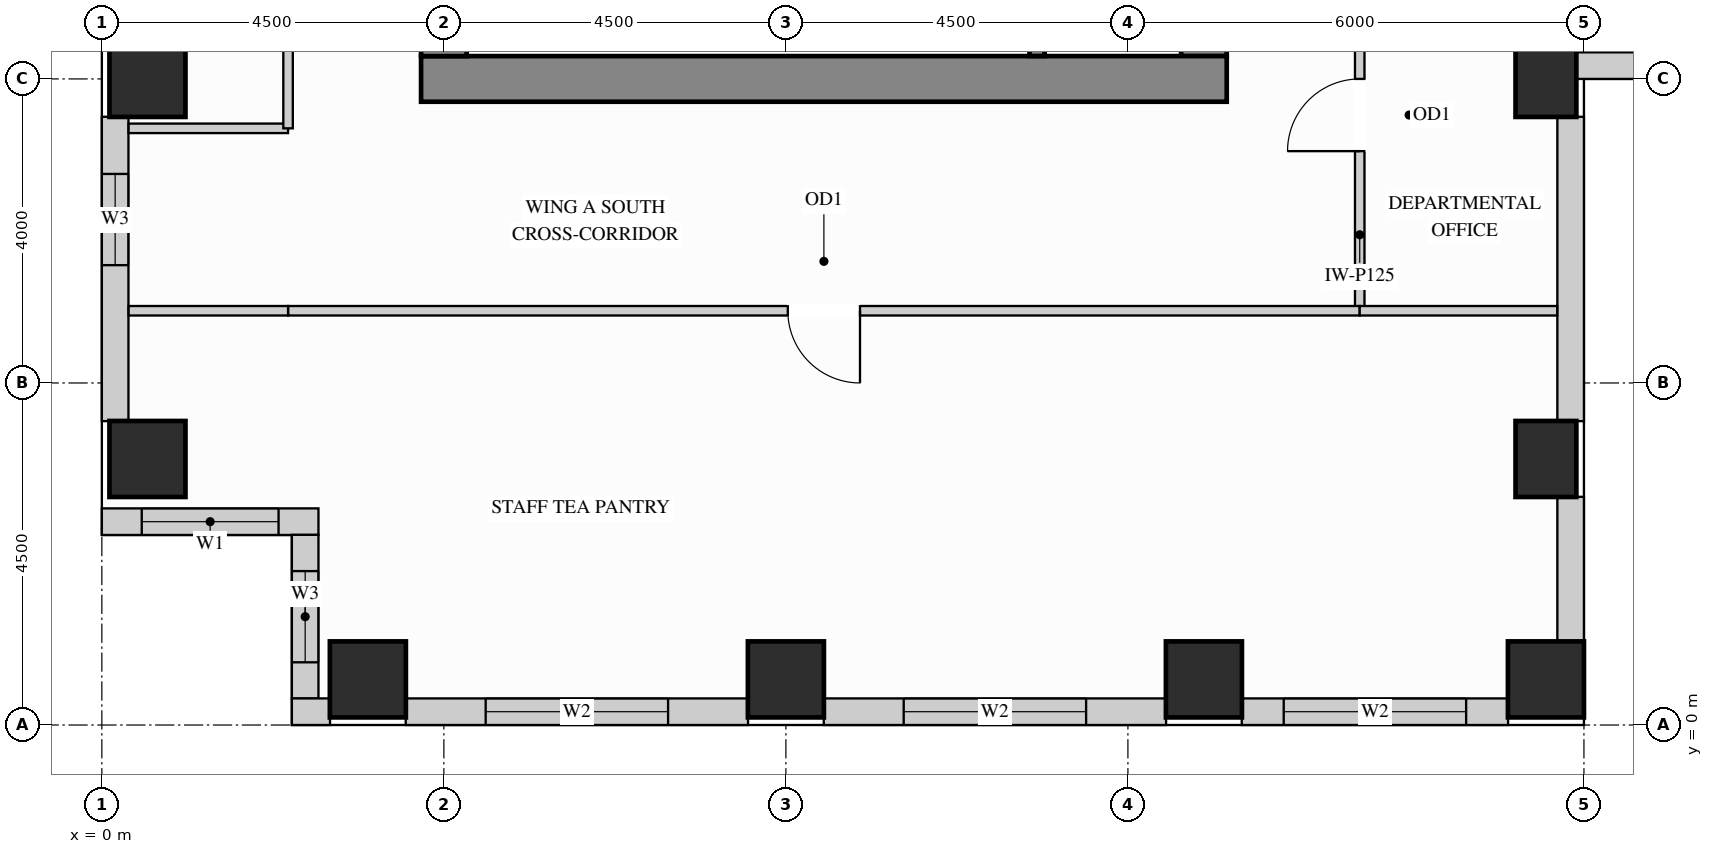
"""IFC4 building model, lengths in metres.
Left out: names, types, materials, properties, quantities, classifications, styles, units other than length and angle.
Written with IfcOpenShell. Run it as: python <this file> out.ifc"""

import sys

from ifc_helpers import new_model, si_unit, direction, frame, frame_2d, origin, origin_2d, place, context, subcontext, project, spatial, rectangle, extrude, source, transform, mapped, element, fill, save


model = new_model("IFC4")
c1 = context("Model", 3, precision=1e-05, world=origin(), true_north=direction((0.0, 1.0)))
c2 = subcontext(c1, "Body", "Model", "MODEL_VIEW")
j1 = project(units=[si_unit("LENGTHUNIT", "METRE"), si_unit("PLANEANGLEUNIT", "RADIAN")], contexts=[c1])
p1 = place(None, origin())
s1 = spatial("IfcSite", under=j1, at=p1, CompositionType="ELEMENT")
p2 = place(p1, origin())
s2 = spatial("IfcBuilding", under=s1, at=p2, CompositionType="ELEMENT")
p3 = place(p2, frame((0.0, 0.0, 171.9)))
s3 = spatial("IfcBuildingStorey", under=s2, at=p3, CompositionType="ELEMENT", Elevation=171.9)
m1 = source(origin(), c2, "Body", "SweptSolid", [
    extrude(rectangle(XDim=0.8, YDim=1.0, at=origin_2d()), origin(), (0.0, 0.0, 1.0), 3.4),
])
for number, where, z_axis, x_axis in (
    (1, (19.0, 3.5, 0.0), (0.0, 0.0, 1.0), (1.0, 0.0, 0.0)),
    (2, (19.0, 8.5, 0.0), (0.0, 0.0, 1.0), (1.0, 0.0, 0.0)),
):
    element("IfcColumn", number, at=place(p3, frame(where, z_axis=z_axis, x_axis=x_axis)), inside=s3, PredefinedType="COLUMN", context=c2, shape_type="MappedRepresentation", body=[
        mapped(m1, transform((0.0, 0.0, 0.0), x_axis=(1.0, 0.0, 0.0), y_axis=(0.0, 1.0, 0.0), z_axis=(0.0, 0.0, 1.0))),
    ])
m2 = source(origin(), c2, "Body", "SweptSolid", [
    extrude(rectangle(XDim=1.0, YDim=1.0, at=origin_2d()), origin(), (0.0, 0.0, 1.0), 3.4),
])
for number, where, z_axis, x_axis in (
    (3, (14.5, 0.6, 0.0), (0.0, 0.0, 1.0), (1.0, 0.0, 0.0)),
    (4, (19.0, 0.6, 0.0), (0.0, 0.0, 1.0), (1.0, 0.0, 0.0)),
    (5, (3.5, 0.6, 0.0), (0.0, 0.0, 1.0), (1.0, 0.0, 0.0)),
    (6, (9.0, 0.6, 0.0), (0.0, 0.0, 1.0), (1.0, 0.0, 0.0)),
    (7, (0.6, 3.5, 0.0), (0.0, 0.0, 1.0), (1.0, 0.0, 0.0)),
    (8, (0.6, 8.5, 0.0), (0.0, 0.0, 1.0), (1.0, 0.0, 0.0)),
):
    element("IfcColumn", number, at=place(p3, frame(where, z_axis=z_axis, x_axis=x_axis)), inside=s3, PredefinedType="COLUMN", context=c2, shape_type="MappedRepresentation", body=[
        mapped(m2, transform((0.0, 0.0, 0.0), x_axis=(1.0, 0.0, 0.0), y_axis=(0.0, 1.0, 0.0), z_axis=(0.0, 0.0, 1.0))),
    ])
m3 = source(origin(), c2, "Body", "SweptSolid", [
    extrude(rectangle(XDim=10.02, YDim=0.6, at=frame_2d((5.01, 0.0))), origin(), (0.0, 0.0, 1.0), 3.4),
])
p4 = place(p3, frame((14.5, 8.8, 0.0), z_axis=(0.0, 0.0, 1.0), x_axis=(0.0, 1.0, 0.0)))
e9 = element("IfcWall", 9, at=p4, inside=s3, PredefinedType="SHEAR", context=c2, shape_type="MappedRepresentation", body=[
    mapped(m3, transform((0.0, 0.0, 0.0), x_axis=(1.0, 0.0, 0.0), y_axis=(0.0, 1.0, 0.0), z_axis=(0.0, 0.0, 1.0))),
])
m4 = source(origin(), c2, "Body", "SweptSolid", [
    extrude(rectangle(XDim=10.6, YDim=0.6, at=frame_2d((5.3, 0.0))), origin(), (0.0, 0.0, 1.0), 3.4),
])
p5 = place(p3, frame((4.2, 8.5, 0.0), z_axis=(0.0, 0.0, 1.0), x_axis=(1.0, 0.0, 0.0)))
e10 = element("IfcWall", 10, at=p5, inside=s3, PredefinedType="SHEAR", context=c2, shape_type="MappedRepresentation", body=[
    mapped(m4, transform((0.0, 0.0, 0.0), x_axis=(1.0, 0.0, 0.0), y_axis=(0.0, 1.0, 0.0), z_axis=(0.0, 0.0, 1.0))),
])
m5 = source(origin(), c2, "Body", "SweptSolid", [
    extrude(rectangle(XDim=20.4, YDim=0.6, at=frame_2d((10.2, 0.0))), origin(), (0.0, 0.0, 1.0), 3.4),
])
p6 = place(p3, frame((4.5, 8.8, 0.0), z_axis=(0.0, 0.0, 1.0), x_axis=(0.0, 1.0, 0.0)))
e11 = element("IfcWall", 11, at=p6, inside=s3, PredefinedType="SHEAR", context=c2, shape_type="MappedRepresentation", body=[
    mapped(m5, transform((0.0, 0.0, 0.0), x_axis=(1.0, 0.0, 0.0), y_axis=(0.0, 1.0, 0.0), z_axis=(0.0, 0.0, 1.0))),
])
p7 = place(p3, frame((0.175, 8.002, 0.0), z_axis=(0.0, 0.0, 1.0), x_axis=(0.0, -1.0, 0.0)))
e12 = element("IfcWall", 12, at=p7, inside=s3, PredefinedType="SOLIDWALL", context=c2, shape_type="SweptSolid", body=[
    extrude(rectangle(XDim=4.004, YDim=0.35, at=frame_2d((2.002, 0.0))), origin(), (0.0, 0.0, 1.0), 2.612),
])
p8 = place(p7, frame((0.752, 0.0, 0.78)))
e13 = element("IfcOpeningElement", 13, at=p8, cuts=e12, PredefinedType="OPENING", context=c2, shape_type="SweptSolid", body=[
    extrude(rectangle(XDim=1.2, YDim=1.652, at=frame_2d((0.6, 0.826))), frame((0.0, 0.185, 0.0), z_axis=(0.0, -1.0, 0.0), x_axis=(1.0, 0.0, 0.0)), (0.0, 0.0, 1.0), 0.37),
])
p9 = place(p3, frame((0.0, 2.675, 0.0), z_axis=(0.0, 0.0, 1.0), x_axis=(1.0, 0.0, 0.0)))
e14 = element("IfcWall", 14, at=p9, inside=s3, PredefinedType="SOLIDWALL", context=c2, shape_type="SweptSolid", body=[
    extrude(rectangle(XDim=2.85, YDim=0.35, at=frame_2d((1.425, 0.0))), origin(), (0.0, 0.0, 1.0), 3.385),
])
p10 = place(p9, frame((0.525, 0.0, 0.78)))
e15 = element("IfcOpeningElement", 15, at=p10, cuts=e14, PredefinedType="OPENING", context=c2, shape_type="SweptSolid", body=[
    extrude(rectangle(XDim=1.8, YDim=2.1, at=frame_2d((0.9, 1.05))), frame((0.0, 0.185, 0.0), z_axis=(0.0, -1.0, 0.0), x_axis=(1.0, 0.0, 0.0)), (0.0, 0.0, 1.0), 0.37),
])
p11 = place(p3, frame((2.675, 2.502, 0.0), z_axis=(0.0, 0.0, 1.0), x_axis=(0.0, -1.0, 0.0)))
e16 = element("IfcWall", 16, at=p11, inside=s3, PredefinedType="SOLIDWALL", context=c2, shape_type="SweptSolid", body=[
    extrude(rectangle(XDim=2.154, YDim=0.35, at=frame_2d((1.077, 0.0))), origin(), (0.0, 0.0, 1.0), 3.385),
])
p12 = place(p11, frame((0.477, 0.0, 0.78)))
e17 = element("IfcOpeningElement", 17, at=p12, cuts=e16, PredefinedType="OPENING", context=c2, shape_type="SweptSolid", body=[
    extrude(rectangle(XDim=1.2, YDim=2.1, at=frame_2d((0.6, 1.05))), frame((0.0, 0.185, 0.0), z_axis=(0.0, -1.0, 0.0), x_axis=(1.0, 0.0, 0.0)), (0.0, 0.0, 1.0), 0.37),
])
m6 = source(origin(), c2, "Body", "SweptSolid", [
    extrude(rectangle(XDim=0.502, YDim=0.35, at=frame_2d((0.251, 0.0))), origin(), (0.0, 0.0, 1.0), 3.385),
])
p13 = place(p3, frame((2.5, 0.175, 0.0), z_axis=(0.0, 0.0, 1.0), x_axis=(1.0, 0.0, 0.0)))
e18 = element("IfcWall", 18, at=p13, inside=s3, PredefinedType="SOLIDWALL", context=c2, shape_type="MappedRepresentation", body=[
    mapped(m6, transform((0.0, 0.0, 0.0), x_axis=(1.0, 0.0, 0.0), y_axis=(0.0, 1.0, 0.0), z_axis=(0.0, 0.0, 1.0))),
])
p14 = place(p3, frame((3.998, 0.175, 0.0), z_axis=(0.0, 0.0, 1.0), x_axis=(1.0, 0.0, 0.0)))
e19 = element("IfcWall", 19, at=p14, inside=s3, PredefinedType="SOLIDWALL", context=c2, shape_type="SweptSolid", body=[
    extrude(rectangle(XDim=4.504, YDim=0.35, at=frame_2d((2.252, 0.0))), origin(), (0.0, 0.0, 1.0), 2.612),
])
p15 = place(p14, frame((1.052, 0.0, 0.78)))
e20 = element("IfcOpeningElement", 20, at=p15, cuts=e19, PredefinedType="OPENING", context=c2, shape_type="SweptSolid", body=[
    extrude(rectangle(XDim=2.4, YDim=1.652, at=frame_2d((1.2, 0.826))), frame((0.0, 0.185, 0.0), z_axis=(0.0, -1.0, 0.0), x_axis=(1.0, 0.0, 0.0)), (0.0, 0.0, 1.0), 0.37),
])
p16 = place(p3, frame((9.498, 0.175, 0.0), z_axis=(0.0, 0.0, 1.0), x_axis=(1.0, 0.0, 0.0)))
e21 = element("IfcWall", 21, at=p16, inside=s3, PredefinedType="SOLIDWALL", context=c2, shape_type="SweptSolid", body=[
    extrude(rectangle(XDim=4.504, YDim=0.35, at=frame_2d((2.252, 0.0))), origin(), (0.0, 0.0, 1.0), 2.612),
])
p17 = place(p16, frame((1.052, 0.0, 0.78)))
e22 = element("IfcOpeningElement", 22, at=p17, cuts=e21, PredefinedType="OPENING", context=c2, shape_type="SweptSolid", body=[
    extrude(rectangle(XDim=2.4, YDim=1.652, at=frame_2d((1.2, 0.826))), frame((0.0, 0.185, 0.0), z_axis=(0.0, -1.0, 0.0), x_axis=(1.0, 0.0, 0.0)), (0.0, 0.0, 1.0), 0.37),
])
p18 = place(p3, frame((14.998, 0.175, 0.0), z_axis=(0.0, 0.0, 1.0), x_axis=(1.0, 0.0, 0.0)))
e23 = element("IfcWall", 23, at=p18, inside=s3, PredefinedType="SOLIDWALL", context=c2, shape_type="SweptSolid", body=[
    extrude(rectangle(XDim=3.504, YDim=0.35, at=frame_2d((1.752, 0.0))), origin(), (0.0, 0.0, 1.0), 2.612),
])
p19 = place(p18, frame((0.552, 0.0, 0.78)))
e24 = element("IfcOpeningElement", 24, at=p19, cuts=e23, PredefinedType="OPENING", context=c2, shape_type="SweptSolid", body=[
    extrude(rectangle(XDim=2.4, YDim=1.652, at=frame_2d((1.2, 0.826))), frame((0.0, 0.185, 0.0), z_axis=(0.0, -1.0, 0.0), x_axis=(1.0, 0.0, 0.0)), (0.0, 0.0, 1.0), 0.37),
])
m7 = source(origin(), c2, "Body", "SweptSolid", [
    extrude(rectangle(XDim=1.904, YDim=0.35, at=frame_2d((0.952, 0.0))), origin(), (0.0, 0.0, 1.0), 2.612),
])
p20 = place(p3, frame((19.325, 1.098, 0.0), z_axis=(0.0, 0.0, 1.0), x_axis=(0.0, 1.0, 0.0)))
e25 = element("IfcWall", 25, at=p20, inside=s3, PredefinedType="SOLIDWALL", context=c2, shape_type="MappedRepresentation", body=[
    mapped(m7, transform((0.0, 0.0, 0.0), x_axis=(1.0, 0.0, 0.0), y_axis=(0.0, 1.0, 0.0), z_axis=(0.0, 0.0, 1.0))),
])
m8 = source(origin(), c2, "Body", "SweptSolid", [
    extrude(rectangle(XDim=4.004, YDim=0.35, at=frame_2d((2.002, 0.0))), origin(), (0.0, 0.0, 1.0), 2.612),
])
p21 = place(p3, frame((19.325, 3.998, 0.0), z_axis=(0.0, 0.0, 1.0), x_axis=(0.0, 1.0, 0.0)))
e26 = element("IfcWall", 26, at=p21, inside=s3, PredefinedType="SOLIDWALL", context=c2, shape_type="MappedRepresentation", body=[
    mapped(m8, transform((0.0, 0.0, 0.0), x_axis=(1.0, 0.0, 0.0), y_axis=(0.0, 1.0, 0.0), z_axis=(0.0, 0.0, 1.0))),
])
p22 = place(p3, frame((19.398, 8.675, 0.0), z_axis=(0.0, 0.0, 1.0), x_axis=(1.0, 0.0, 0.0)))
e27 = element("IfcWall", 27, at=p22, inside=s3, PredefinedType="SOLIDWALL", context=c2, shape_type="SweptSolid", body=[
    extrude(rectangle(XDim=3.604, YDim=0.35, at=frame_2d((1.802, 0.0))), origin(), (0.0, 0.0, 1.0), 3.385),
])
p23 = place(p22, frame((1.067, 0.0, 0.78)))
e28 = element("IfcOpeningElement", 28, at=p23, cuts=e27, PredefinedType="OPENING", context=c2, shape_type="SweptSolid", body=[
    extrude(rectangle(XDim=1.5, YDim=2.0, at=frame_2d((0.75, 1.0))), frame((0.0, 0.185, 0.0), z_axis=(0.0, -1.0, 0.0), x_axis=(1.0, 0.0, 0.0)), (0.0, 0.0, 1.0), 0.37),
])
p24 = place(p3, frame((16.55, 5.45, 0.0), z_axis=(0.0, 0.0, 1.0), x_axis=(0.0, 1.0, 0.0)))
e29 = element("IfcWall", 29, at=p24, inside=s3, PredefinedType="PARTITIONING", context=c2, shape_type="SweptSolid", body=[
    extrude(rectangle(XDim=5.15, YDim=0.125, at=frame_2d((2.575, 0.0))), origin(), (0.0, 0.0, 1.0), 3.385),
])
p25 = place(p24, frame((2.1, 0.0, 0.0)))
e30 = element("IfcOpeningElement", 30, at=p25, cuts=e29, PredefinedType="OPENING", context=c2, shape_type="SweptSolid", body=[
    extrude(rectangle(XDim=0.95, YDim=2.15, at=frame_2d((0.475, 1.075))), frame((0.0, 0.073, 0.0), z_axis=(0.0, -1.0, 0.0), x_axis=(1.0, 0.0, 0.0)), (0.0, 0.0, 1.0), 0.145),
])
m9 = source(origin(), c2, "Body", "SweptSolid", [
    extrude(rectangle(XDim=2.098, YDim=0.125, at=frame_2d((1.049, 0.0))), origin(), (0.0, 0.0, 1.0), 3.385),
])
p26 = place(p3, frame((0.352, 7.85, 0.0), z_axis=(0.0, 0.0, 1.0), x_axis=(1.0, 0.0, 0.0)))
e31 = element("IfcWall", 31, at=p26, inside=s3, PredefinedType="PARTITIONING", context=c2, shape_type="MappedRepresentation", body=[
    mapped(m9, transform((0.0, 0.0, 0.0), x_axis=(1.0, 0.0, 0.0), y_axis=(0.0, 1.0, 0.0), z_axis=(0.0, 0.0, 1.0))),
])
p27 = place(p3, frame((2.45, 5.45, 0.0), z_axis=(0.0, 0.0, 1.0), x_axis=(1.0, 0.0, 0.0)))
e32 = element("IfcWall", 32, at=p27, inside=s3, PredefinedType="PARTITIONING", context=c2, shape_type="SweptSolid", body=[
    extrude(rectangle(XDim=14.1, YDim=0.125, at=frame_2d((7.05, 0.0))), origin(), (0.0, 0.0, 1.0), 3.385),
])
p28 = place(p27, frame((6.575, 0.0, 0.0)))
e33 = element("IfcOpeningElement", 33, at=p28, cuts=e32, PredefinedType="OPENING", context=c2, shape_type="SweptSolid", body=[
    extrude(rectangle(XDim=0.95, YDim=2.15, at=frame_2d((0.475, 1.075))), frame((0.0, 0.073, 0.0), z_axis=(0.0, -1.0, 0.0), x_axis=(1.0, 0.0, 0.0)), (0.0, 0.0, 1.0), 0.145),
])
p29 = place(p3, frame((0.352, 5.45, 0.0), z_axis=(0.0, 0.0, 1.0), x_axis=(1.0, 0.0, 0.0)))
e34 = element("IfcWall", 34, at=p29, inside=s3, PredefinedType="PARTITIONING", context=c2, shape_type="MappedRepresentation", body=[
    mapped(m9, transform((0.0, 0.0, 0.0), x_axis=(1.0, 0.0, 0.0), y_axis=(0.0, 1.0, 0.0), z_axis=(0.0, 0.0, 1.0))),
])
m10 = source(origin(), c2, "Body", "SweptSolid", [
    extrude(rectangle(XDim=2.598, YDim=0.125, at=frame_2d((1.299, 0.0))), origin(), (0.0, 0.0, 1.0), 3.385),
])
p30 = place(p3, frame((16.55, 5.45, 0.0), z_axis=(0.0, 0.0, 1.0), x_axis=(1.0, 0.0, 0.0)))
e35 = element("IfcWall", 35, at=p30, inside=s3, PredefinedType="PARTITIONING", context=c2, shape_type="MappedRepresentation", body=[
    mapped(m10, transform((0.0, 0.0, 0.0), x_axis=(1.0, 0.0, 0.0), y_axis=(0.0, 1.0, 0.0), z_axis=(0.0, 0.0, 1.0))),
])
p31 = place(p3, frame((2.45, 7.85, 0.0), z_axis=(0.0, 0.0, 1.0), x_axis=(0.0, 1.0, 0.0)))
e36 = element("IfcWall", 36, at=p31, inside=s3, PredefinedType="PARTITIONING", context=c2, shape_type="SweptSolid", body=[
    extrude(rectangle(XDim=7.25, YDim=0.125, at=frame_2d((3.625, 0.0))), origin(), (0.0, 0.0, 1.0), 3.385),
])
p32 = place(p31, frame((3.15, 0.0, 0.0)))
e37 = element("IfcOpeningElement", 37, at=p32, cuts=e36, PredefinedType="OPENING", context=c2, shape_type="SweptSolid", body=[
    extrude(rectangle(XDim=0.95, YDim=2.15, at=frame_2d((0.475, 1.075))), frame((0.0, 0.073, 0.0), z_axis=(0.0, -1.0, 0.0), x_axis=(1.0, 0.0, 0.0)), (0.0, 0.0, 1.0), 0.145),
])
m11 = source(origin(), c2, "Body", "SweptSolid", [
    extrude(rectangle(XDim=3.753, YDim=0.2, at=frame_2d((1.876, 0.0))), origin(), (0.0, 0.0, 1.0), 3.4),
])
p33 = place(p3, frame((12.305, 8.802, 0.0), z_axis=(0.0, 0.0, 1.0), x_axis=(0.0, 1.0, 0.0)))
e38 = element("IfcWall", 38, at=p33, inside=s3, PredefinedType="SHEAR", context=c2, shape_type="MappedRepresentation", body=[
    mapped(m11, transform((0.0, 0.0, 0.0), x_axis=(1.0, 0.0, 0.0), y_axis=(0.0, 1.0, 0.0), z_axis=(0.0, 0.0, 1.0))),
])
m12 = source(origin(), c2, "Body", "SweptSolid", [
    extrude(rectangle(XDim=0.95, YDim=2.15, at=frame_2d((0.475, 1.075))), frame((0.0, 0.025, 0.0), z_axis=(0.0, -1.0, 0.0), x_axis=(1.0, 0.0, 0.0)), (0.0, 0.0, 1.0), 0.05),
])
p34 = place(p25, origin())
e39 = element("IfcDoor", 39, at=p34, inside=s3, OperationType="SINGLE_SWING_LEFT", PredefinedType="DOOR", context=c2, shape_type="MappedRepresentation", body=[
    mapped(m12, transform((0.0, 0.0, 0.0), x_axis=(1.0, 0.0, 0.0), y_axis=(0.0, 1.0, 0.0), z_axis=(0.0, 0.0, 1.0))),
])
fill(e30, e39)
p35 = place(p28, origin())
e40 = element("IfcDoor", 40, at=p35, inside=s3, OperationType="SINGLE_SWING_RIGHT", PredefinedType="DOOR", context=c2, shape_type="MappedRepresentation", body=[
    mapped(m12, transform((0.0, 0.0, 0.0), x_axis=(1.0, 0.0, 0.0), y_axis=(0.0, 1.0, 0.0), z_axis=(0.0, 0.0, 1.0))),
])
fill(e33, e40)
m13 = source(origin(), c2, "Body", "SweptSolid", [
    extrude(rectangle(XDim=1.8, YDim=2.1, at=frame_2d((0.9, 1.05))), frame((0.0, 0.03, 0.0), z_axis=(0.0, -1.0, 0.0), x_axis=(1.0, 0.0, 0.0)), (0.0, 0.0, 1.0), 0.06),
])
p36 = place(p10, origin())
e41 = element("IfcWindow", 41, at=p36, inside=s3, PartitioningType="SINGLE_PANEL", PredefinedType="WINDOW", context=c2, shape_type="MappedRepresentation", body=[
    mapped(m13, transform((0.0, 0.0, 0.0), x_axis=(1.0, 0.0, 0.0), y_axis=(0.0, 1.0, 0.0), z_axis=(0.0, 0.0, 1.0))),
])
fill(e15, e41)
m14 = source(origin(), c2, "Body", "SweptSolid", [
    extrude(rectangle(XDim=2.4, YDim=1.652, at=frame_2d((1.2, 0.826))), frame((0.0, 0.03, 0.0), z_axis=(0.0, -1.0, 0.0), x_axis=(1.0, 0.0, 0.0)), (0.0, 0.0, 1.0), 0.06),
])
p37 = place(p15, origin())
e42 = element("IfcWindow", 42, at=p37, inside=s3, PartitioningType="SINGLE_PANEL", PredefinedType="WINDOW", context=c2, shape_type="MappedRepresentation", body=[
    mapped(m14, transform((0.0, 0.0, 0.0), x_axis=(1.0, 0.0, 0.0), y_axis=(0.0, 1.0, 0.0), z_axis=(0.0, 0.0, 1.0))),
])
fill(e20, e42)
p38 = place(p17, origin())
e43 = element("IfcWindow", 43, at=p38, inside=s3, PartitioningType="SINGLE_PANEL", PredefinedType="WINDOW", context=c2, shape_type="MappedRepresentation", body=[
    mapped(m14, transform((0.0, 0.0, 0.0), x_axis=(1.0, 0.0, 0.0), y_axis=(0.0, 1.0, 0.0), z_axis=(0.0, 0.0, 1.0))),
])
fill(e22, e43)
p39 = place(p19, origin())
e44 = element("IfcWindow", 44, at=p39, inside=s3, PartitioningType="SINGLE_PANEL", PredefinedType="WINDOW", context=c2, shape_type="MappedRepresentation", body=[
    mapped(m14, transform((0.0, 0.0, 0.0), x_axis=(1.0, 0.0, 0.0), y_axis=(0.0, 1.0, 0.0), z_axis=(0.0, 0.0, 1.0))),
])
fill(e24, e44)
m15 = source(origin(), c2, "Body", "SweptSolid", [
    extrude(rectangle(XDim=1.2, YDim=1.652, at=frame_2d((0.6, 0.826))), frame((0.0, 0.03, 0.0), z_axis=(0.0, -1.0, 0.0), x_axis=(1.0, 0.0, 0.0)), (0.0, 0.0, 1.0), 0.06),
])
p40 = place(p8, origin())
e45 = element("IfcWindow", 45, at=p40, inside=s3, PartitioningType="SINGLE_PANEL", PredefinedType="WINDOW", context=c2, shape_type="MappedRepresentation", body=[
    mapped(m15, transform((0.0, 0.0, 0.0), x_axis=(1.0, 0.0, 0.0), y_axis=(0.0, 1.0, 0.0), z_axis=(0.0, 0.0, 1.0))),
])
fill(e13, e45)
m16 = source(origin(), c2, "Body", "SweptSolid", [
    extrude(rectangle(XDim=1.2, YDim=2.1, at=frame_2d((0.6, 1.05))), frame((0.0, 0.03, 0.0), z_axis=(0.0, -1.0, 0.0), x_axis=(1.0, 0.0, 0.0)), (0.0, 0.0, 1.0), 0.06),
])
p41 = place(p12, origin())
e46 = element("IfcWindow", 46, at=p41, inside=s3, PartitioningType="SINGLE_PANEL", PredefinedType="WINDOW", context=c2, shape_type="MappedRepresentation", body=[
    mapped(m16, transform((0.0, 0.0, 0.0), x_axis=(1.0, 0.0, 0.0), y_axis=(0.0, 1.0, 0.0), z_axis=(0.0, 0.0, 1.0))),
])
fill(e17, e46)
save(model, sys.argv[1])
